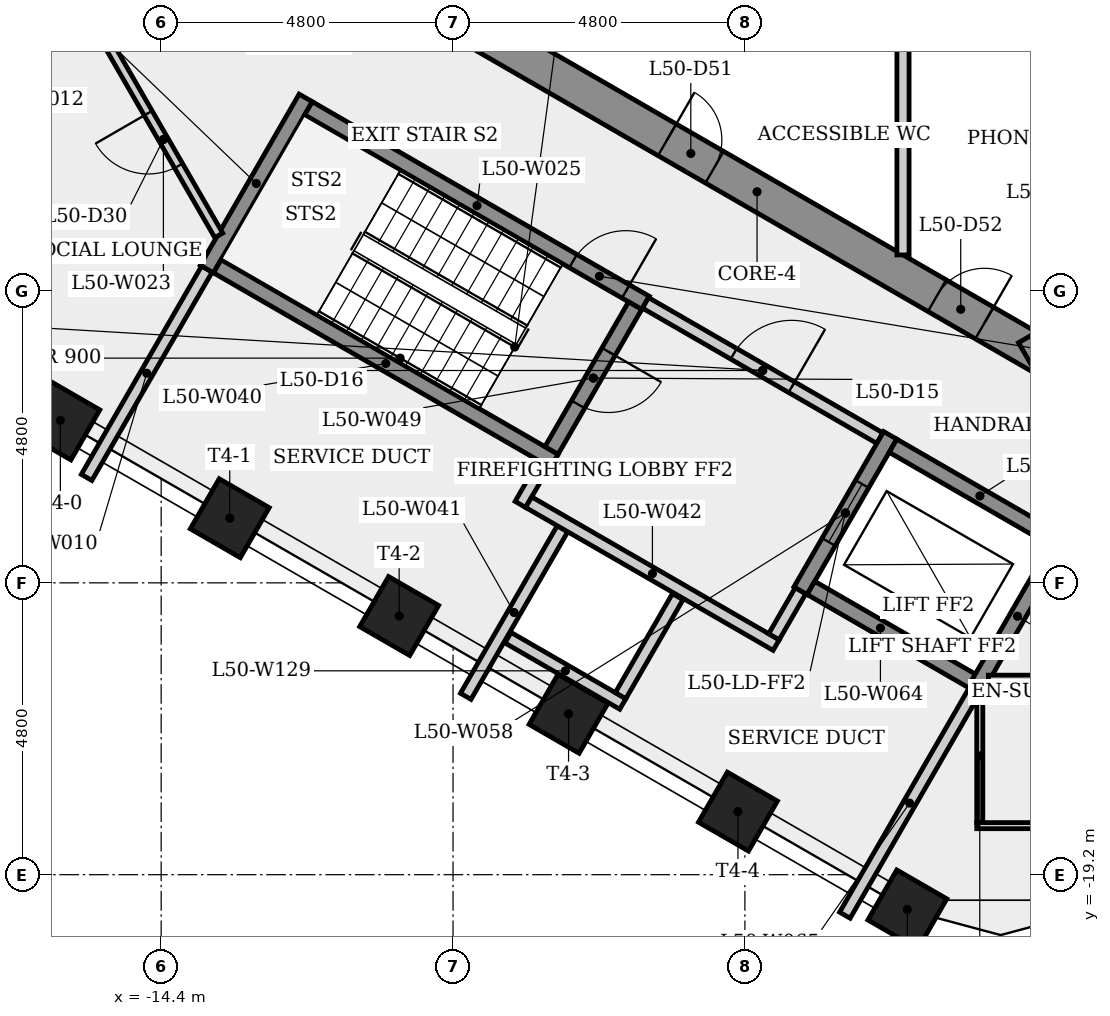
"""IFC4 building model, lengths in metres.
Left out: names, types, materials, properties, quantities, classifications, styles, units other than length and angle.
Written with IfcOpenShell. Run it as: python <this file> out.ifc"""

import sys

from ifc_helpers import new_model, si_unit, direction, frame, frame_2d, origin, origin_2d, place, context, subcontext, project, spatial, rectangle, extrude, element, fill, save


model = new_model("IFC4")
c1 = context("Model", 3, precision=1e-05, world=origin(), true_north=direction((0.0, 1.0)))
c2 = subcontext(c1, "Body", "Model", "MODEL_VIEW")
j1 = project(units=[si_unit("LENGTHUNIT", "METRE"), si_unit("PLANEANGLEUNIT", "RADIAN")], contexts=[c1])
p1 = place(None, origin())
s1 = spatial("IfcSite", under=j1, at=p1, CompositionType="ELEMENT")
p2 = place(p1, origin())
s2 = spatial("IfcBuilding", under=s1, at=p2, CompositionType="ELEMENT")
p3 = place(p2, frame((0.0, 0.0, 186.7)))
s3 = spatial("IfcBuildingStorey", under=s2, at=p3, CompositionType="ELEMENT", Elevation=186.7)
p4 = place(p3, frame((-9.35, -5.225, 0.0), z_axis=(0.0, 0.0, 1.0), x_axis=(0.866023993627, -0.500002442456, 0.0)))
e1 = element("IfcWall", 1, at=p4, inside=s3, PredefinedType="SHEAR", context=c2, shape_type="SweptSolid", body=[
    extrude(rectangle(XDim=10.97, YDim=0.6, at=frame_2d((5.485, 0.0))), origin(), (0.0, 0.0, 1.0), 4.0),
])
p5 = place(p4, frame((3.777, 0.0, 0.0)))
e2 = element("IfcOpeningElement", 2, at=p5, cuts=e1, PredefinedType="OPENING", context=c2, shape_type="SweptSolid", body=[
    extrude(rectangle(XDim=0.9, YDim=2.1, at=frame_2d((0.45, 1.05))), frame((0.0, 0.31, 0.0), z_axis=(0.0, -1.0, 0.0), x_axis=(1.0, 0.0, 0.0)), (0.0, 0.0, 1.0), 0.62),
])
p6 = place(p4, frame((8.903, 0.0, 0.0)))
e3 = element("IfcOpeningElement", 3, at=p6, cuts=e1, PredefinedType="OPENING", context=c2, shape_type="SweptSolid", body=[
    extrude(rectangle(XDim=0.9, YDim=2.1, at=frame_2d((0.45, 1.05))), frame((0.0, 0.31, 0.0), z_axis=(0.0, -1.0, 0.0), x_axis=(1.0, 0.0, 0.0)), (0.0, 0.0, 1.0), 0.62),
])
p7 = place(p3, frame((-0.15, -10.71, 0.0), z_axis=(0.0, 0.0, 1.0), x_axis=(0.866023993627, 0.500002442456, 0.0)))
e4 = element("IfcWall", 4, at=p7, inside=s3, PredefinedType="SHEAR", context=c2, shape_type="SweptSolid", body=[
    extrude(rectangle(XDim=10.97, YDim=0.6, at=frame_2d((5.485, 0.0))), origin(), (0.0, 0.0, 1.0), 4.0),
])
p8 = place(p7, frame((7.628, 0.0, 0.0)))
e5 = element("IfcOpeningElement", 5, at=p8, cuts=e4, PredefinedType="OPENING", context=c2, shape_type="SweptSolid", body=[
    extrude(rectangle(XDim=0.9, YDim=2.1, at=frame_2d((0.45, 1.05))), frame((0.0, 0.31, 0.0), z_axis=(0.0, -1.0, 0.0), x_axis=(1.0, 0.0, 0.0)), (0.0, 0.0, 1.0), 0.62),
])
for number, where, z_axis, x_axis in (
    (6, (-16.058, -11.729, 0.0), (0.0, 0.0, 1.0), (-0.5, -0.866, 0.0)),
    (7, (-13.272, -13.337, 0.0), (0.0, 0.0, 1.0), (-0.5, -0.866, 0.0)),
    (8, (-10.486, -14.946, 0.0), (0.0, 0.0, 1.0), (-0.5, -0.866, 0.0)),
    (9, (-7.7, -16.554, 0.0), (0.0, 0.0, 1.0), (-0.5, -0.866, 0.0)),
    (10, (-4.914, -18.163, 0.0), (0.0, 0.0, 1.0), (-0.5, -0.866, 0.0)),
    (11, (-2.128, -19.771, 0.0), (0.0, 0.0, 1.0), (-0.5, -0.866, 0.0)),
):
    element("IfcColumn", number, at=place(p3, frame(where, z_axis=z_axis, x_axis=x_axis)), inside=s3, PredefinedType="COLUMN", context=c2, shape_type="SweptSolid", body=[
        extrude(rectangle(XDim=0.95, YDim=0.95, at=origin_2d()), origin(), (0.0, 0.0, 1.0), 4.0),
    ])
p9 = place(p3, frame((-15.627, -12.666, 0.0), z_axis=(0.0, 0.0, 1.0), x_axis=(0.499980548326, 0.866036633923, 0.0)))
e12 = element("IfcWall", 12, at=p9, inside=s3, PredefinedType="PLUMBINGWALL", context=c2, shape_type="SweptSolid", body=[
    extrude(rectangle(XDim=3.958, YDim=0.2, at=frame_2d((1.979, 0.0))), origin(), (0.0, 0.0, 1.0), 3.6),
])
p10 = place(p3, frame((-13.648, -9.239, 0.0), z_axis=(0.0, 0.0, 1.0), x_axis=(0.500017246033, 0.866015446554, 0.0)))
e13 = element("IfcWall", 13, at=p10, inside=s3, PredefinedType="SHEAR", context=c2, shape_type="SweptSolid", body=[
    extrude(rectangle(XDim=3.25, YDim=0.25, at=frame_2d((1.625, 0.0))), origin(), (0.0, 0.0, 1.0), 3.6),
])
p11 = place(p3, frame((-13.453, -8.685, 0.0), z_axis=(0.0, 0.0, 1.0), x_axis=(-0.499989401968, 0.866031522475, 0.0)))
e14 = element("IfcWall", 14, at=p11, inside=s3, PredefinedType="PARTITIONING", context=c2, shape_type="SweptSolid", body=[
    extrude(rectangle(XDim=3.642, YDim=0.15, at=frame_2d((1.821, 0.0))), origin(), (0.0, 0.0, 1.0), 3.6),
])
p12 = place(p11, frame((1.321, 0.0, 0.0)))
e15 = element("IfcOpeningElement", 15, at=p12, cuts=e14, PredefinedType="OPENING", context=c2, shape_type="SweptSolid", body=[
    extrude(rectangle(XDim=1.0, YDim=2.1, at=frame_2d((0.5, 1.05))), frame((0.0, 0.085, 0.0), z_axis=(0.0, -1.0, 0.0), x_axis=(1.0, 0.0, 0.0)), (0.0, 0.0, 1.0), 0.17),
])
p13 = place(p3, frame((-11.977, -6.595, 0.0), z_axis=(0.0, 0.0, 1.0), x_axis=(0.866025499775, -0.499999833739, 0.0)))
e16 = element("IfcWall", 16, at=p13, inside=s3, PredefinedType="SHEAR", context=c2, shape_type="SweptSolid", body=[
    extrude(rectangle(XDim=6.4, YDim=0.25, at=frame_2d((3.2, 0.0))), origin(), (0.0, 0.0, 1.0), 3.6),
])
p14 = place(p13, frame((5.025, 0.0, 0.0)))
e17 = element("IfcOpeningElement", 17, at=p14, cuts=e16, PredefinedType="OPENING", context=c2, shape_type="SweptSolid", body=[
    extrude(rectangle(XDim=1.0, YDim=2.1, at=frame_2d((0.5, 1.05))), frame((0.0, 0.135, 0.0), z_axis=(0.0, -1.0, 0.0), x_axis=(1.0, 0.0, 0.0)), (0.0, 0.0, 1.0), 0.27),
])
p15 = place(p3, frame((-8.493, -13.11, 0.0), z_axis=(0.0, 0.0, 1.0), x_axis=(0.500067724834, 0.865986299303, 0.0)))
e18 = element("IfcWall", 18, at=p15, inside=s3, PredefinedType="PLUMBINGWALL", context=c2, shape_type="SweptSolid", body=[
    extrude(rectangle(XDim=0.775, YDim=0.2, at=frame_2d((0.388, 0.0))), origin(), (0.0, 0.0, 1.0), 3.6),
])
p16 = place(p3, frame((-7.935, -12.393, 0.0), z_axis=(0.0, 0.0, 1.0), x_axis=(-0.866025499775, 0.499999833739, 0.0)))
e19 = element("IfcWall", 19, at=p16, inside=s3, PredefinedType="SHEAR", context=c2, shape_type="SweptSolid", body=[
    extrude(rectangle(XDim=6.4, YDim=0.25, at=frame_2d((3.2, 0.0))), origin(), (0.0, 0.0, 1.0), 3.6),
])
p17 = place(p3, frame((-7.8, -13.51, 0.0), z_axis=(0.0, 0.0, 1.0), x_axis=(-0.500016846771, -0.866015677078, 0.0)))
e20 = element("IfcWall", 20, at=p17, inside=s3, PredefinedType="PLUMBINGWALL", context=c2, shape_type="SweptSolid", body=[
    extrude(rectangle(XDim=3.183, YDim=0.2, at=frame_2d((1.591, 0.0))), origin(), (0.0, 0.0, 1.0), 3.6),
])
p18 = place(p3, frame((-8.356, -13.073, 0.0), z_axis=(0.0, 0.0, 1.0), x_axis=(0.866038532462, -0.499977259774, 0.0)))
e21 = element("IfcWall", 21, at=p18, inside=s3, PredefinedType="PLUMBINGWALL", context=c2, shape_type="SweptSolid", body=[
    extrude(rectangle(XDim=4.7, YDim=0.2, at=frame_2d((2.35, 0.0))), origin(), (0.0, 0.0, 1.0), 3.6),
])
p19 = place(p3, frame((-6.605, -9.841, 0.0), z_axis=(0.0, 0.0, 1.0), x_axis=(-0.499996545922, -0.866027397988, 0.0)))
e22 = element("IfcWall", 22, at=p19, inside=s3, PredefinedType="SHEAR", context=c2, shape_type="SweptSolid", body=[
    extrude(rectangle(XDim=2.75, YDim=0.25, at=frame_2d((1.375, 0.0))), origin(), (0.0, 0.0, 1.0), 3.6),
])
p20 = place(p19, frame((0.875, 0.0, 0.0)))
e23 = element("IfcOpeningElement", 23, at=p20, cuts=e22, PredefinedType="OPENING", context=c2, shape_type="SweptSolid", body=[
    extrude(rectangle(XDim=1.0, YDim=2.1, at=frame_2d((0.5, 1.05))), frame((0.0, 0.135, 0.0), z_axis=(0.0, -1.0, 0.0), x_axis=(1.0, 0.0, 0.0)), (0.0, 0.0, 1.0), 0.27),
])
p21 = place(p3, frame((-6.435, -9.795, 0.0), z_axis=(0.0, 0.0, 1.0), x_axis=(0.866012907634, -0.500021643343, 0.0)))
e24 = element("IfcWall", 24, at=p21, inside=s3, PredefinedType="PARTITIONING", context=c2, shape_type="SweptSolid", body=[
    extrude(rectangle(XDim=4.45, YDim=0.2, at=frame_2d((2.225, 0.0))), origin(), (0.0, 0.0, 1.0), 3.6),
])
p22 = place(p21, frame((1.675, 0.0, 0.0)))
e25 = element("IfcOpeningElement", 25, at=p22, cuts=e24, PredefinedType="OPENING", context=c2, shape_type="SweptSolid", body=[
    extrude(rectangle(XDim=1.1, YDim=2.1, at=frame_2d((0.55, 1.05))), frame((0.0, 0.11, 0.0), z_axis=(0.0, -1.0, 0.0), x_axis=(1.0, 0.0, 0.0)), (0.0, 0.0, 1.0), 0.22),
])
p23 = place(p3, frame((-3.885, -14.529, 0.0), z_axis=(0.0, 0.0, 1.0), x_axis=(-0.499859285417, -0.866106630146, 0.0)))
e26 = element("IfcWall", 26, at=p23, inside=s3, PredefinedType="PLUMBINGWALL", context=c2, shape_type="SweptSolid", body=[
    extrude(rectangle(XDim=0.875, YDim=0.2, at=frame_2d((0.438, 0.0))), origin(), (0.0, 0.0, 1.0), 3.6),
])
p24 = place(p3, frame((-2.41, -11.974, 0.0), z_axis=(0.0, 0.0, 1.0), x_axis=(-0.500001826776, -0.866024349092, 0.0)))
e27 = element("IfcWall", 27, at=p24, inside=s3, PredefinedType="SHEAR", context=c2, shape_type="SweptSolid", body=[
    extrude(rectangle(XDim=2.95, YDim=0.25, at=frame_2d((1.475, 0.0))), origin(), (0.0, 0.0, 1.0), 3.6),
])
p25 = place(p24, frame((0.925, 0.0, 0.0)))
e28 = element("IfcOpeningElement", 28, at=p25, cuts=e27, PredefinedType="OPENING", context=c2, shape_type="SweptSolid", body=[
    extrude(rectangle(XDim=1.1, YDim=2.1, at=frame_2d((0.55, 1.05))), frame((0.0, 0.135, 0.0), z_axis=(0.0, -1.0, 0.0), x_axis=(1.0, 0.0, 0.0)), (0.0, 0.0, 1.0), 0.27),
])
p26 = place(p3, frame((-2.364, -12.145, 0.0), z_axis=(0.0, 0.0, 1.0), x_axis=(0.866040211805, -0.499974350878, 0.0)))
e29 = element("IfcWall", 29, at=p26, inside=s3, PredefinedType="SHEAR", context=c2, shape_type="SweptSolid", body=[
    extrude(rectangle(XDim=3.3, YDim=0.25, at=frame_2d((1.65, 0.0))), origin(), (0.0, 0.0, 1.0), 3.6),
])
p27 = place(p3, frame((-2.2, -5.25, 0.0), z_axis=(0.0, 0.0, 1.0), x_axis=(0.0, -1.0, 0.0)))
e30 = element("IfcWall", 30, at=p27, inside=s3, PredefinedType="PARTITIONING", context=c2, shape_type="SweptSolid", body=[
    extrude(rectangle(XDim=3.757, YDim=0.2, at=frame_2d((1.878, 0.0))), origin(), (0.0, 0.0, 1.0), 3.6),
])
p28 = place(p3, frame((-0.856, -16.133, 0.0), z_axis=(0.0, 0.0, 1.0), x_axis=(-0.866021716278, 0.500006386895, 0.0)))
e31 = element("IfcWall", 31, at=p28, inside=s3, PredefinedType="SHEAR", context=c2, shape_type="SweptSolid", body=[
    extrude(rectangle(XDim=3.3, YDim=0.25, at=frame_2d((1.65, 0.0))), origin(), (0.0, 0.0, 1.0), 3.6),
])
p29 = place(p3, frame((-1.027, -16.179, 0.0), z_axis=(0.0, 0.0, 1.0), x_axis=(-0.500011993549, -0.866018479195, 0.0)))
e32 = element("IfcWall", 32, at=p29, inside=s3, PredefinedType="PLUMBINGWALL", context=c2, shape_type="SweptSolid", body=[
    extrude(rectangle(XDim=4.258, YDim=0.2, at=frame_2d((2.129, 0.0))), origin(), (0.0, 0.0, 1.0), 3.6),
])
p30 = place(p3, frame((-0.987, -18.393, 0.0), z_axis=(0.0, 0.0, 1.0), x_axis=(1.0, 0.0, 0.0)))
e33 = element("IfcWall", 33, at=p30, inside=s3, PredefinedType="PARTITIONING", context=c2, shape_type="SweptSolid", body=[
    extrude(rectangle(XDim=2.4, YDim=0.1, at=frame_2d((1.2, 0.0))), origin(), (0.0, 0.0, 1.0), 3.6),
])
p31 = place(p3, frame((-0.937, -16.148, 0.0), z_axis=(0.0, 0.0, 1.0), x_axis=(0.0, -1.0, 0.0)))
e34 = element("IfcWall", 34, at=p31, inside=s3, PredefinedType="PARTITIONING", context=c2, shape_type="SweptSolid", body=[
    extrude(rectangle(XDim=2.195, YDim=0.1, at=frame_2d((1.098, 0.0))), origin(), (0.0, 0.0, 1.0), 3.6),
])
p32 = place(p3, frame((0.323, -13.841, 0.0), z_axis=(0.0, 0.0, 1.0), x_axis=(-0.500066320839, -0.865987110044, 0.0)))
e35 = element("IfcWall", 35, at=p32, inside=s3, PredefinedType="SHEAR", context=c2, shape_type="SweptSolid", body=[
    extrude(rectangle(XDim=2.561, YDim=0.25, at=frame_2d((1.28, 0.0))), origin(), (0.0, 0.0, 1.0), 4.0),
])
p33 = place(p3, frame((-0.795, -15.993, 0.0), z_axis=(0.0, 0.0, 1.0), x_axis=(1.0, 0.0, 0.0)))
e36 = element("IfcWall", 36, at=p33, inside=s3, PredefinedType="PARTITIONING", context=c2, shape_type="SweptSolid", body=[
    extrude(rectangle(XDim=4.386, YDim=0.15, at=frame_2d((2.193, 0.0))), origin(), (0.0, 0.0, 1.0), 3.6),
])
p34 = place(p33, frame((2.837, 0.0, 0.0)))
e37 = element("IfcOpeningElement", 37, at=p34, cuts=e36, PredefinedType="OPENING", context=c2, shape_type="SweptSolid", body=[
    extrude(rectangle(XDim=0.9, YDim=2.1, at=frame_2d((0.45, 1.05))), frame((0.0, 0.085, 0.0), z_axis=(0.0, -1.0, 0.0), x_axis=(1.0, 0.0, 0.0)), (0.0, 0.0, 1.0), 0.17),
])
p35 = place(p3, frame((-6.808, -16.392, 0.0), z_axis=(0.0, 0.0, 1.0), x_axis=(-0.866008413041, 0.500029427677, 0.0)))
e38 = element("IfcWall", 38, at=p35, inside=s3, PredefinedType="PLUMBINGWALL", context=c2, shape_type="SweptSolid", body=[
    extrude(rectangle(XDim=2.18, YDim=0.2, at=frame_2d((1.09, 0.0))), origin(), (0.0, 0.0, 1.0), 3.6),
])
p36 = place(p3, frame((-5.905, -14.627, 0.0), z_axis=(0.0, 0.0, 1.0), x_axis=(-0.499966013754, -0.866045024864, 0.0)))
e39 = element("IfcWall", 39, at=p36, inside=s3, PredefinedType="PLUMBINGWALL", context=c2, shape_type="SweptSolid", body=[
    extrude(rectangle(XDim=1.88, YDim=0.2, at=frame_2d((0.94, 0.0))), origin(), (0.0, 0.0, 1.0), 3.6),
])
p37 = place(p14, origin())
e40 = element("IfcDoor", 40, at=p37, inside=s3, OperationType="SINGLE_SWING_RIGHT", PredefinedType="DOOR", context=c2, shape_type="SweptSolid", body=[
    extrude(rectangle(XDim=1.0, YDim=2.1, at=frame_2d((0.5, 1.05))), frame((0.0, 0.025, 0.0), z_axis=(0.0, -1.0, 0.0), x_axis=(1.0, 0.0, 0.0)), (0.0, 0.0, 1.0), 0.05),
])
fill(e17, e40)
p38 = place(p20, origin())
e41 = element("IfcDoor", 41, at=p38, inside=s3, OperationType="SINGLE_SWING_LEFT", PredefinedType="DOOR", context=c2, shape_type="SweptSolid", body=[
    extrude(rectangle(XDim=1.0, YDim=2.1, at=frame_2d((0.5, 1.05))), frame((0.0, 0.025, 0.0), z_axis=(0.0, -1.0, 0.0), x_axis=(1.0, 0.0, 0.0)), (0.0, 0.0, 1.0), 0.05),
])
fill(e23, e41)
p39 = place(p22, origin())
e42 = element("IfcDoor", 42, at=p39, inside=s3, OperationType="SINGLE_SWING_RIGHT", PredefinedType="DOOR", context=c2, shape_type="SweptSolid", body=[
    extrude(rectangle(XDim=1.1, YDim=2.1, at=frame_2d((0.55, 1.05))), frame((0.0, 0.025, 0.0), z_axis=(0.0, -1.0, 0.0), x_axis=(1.0, 0.0, 0.0)), (0.0, 0.0, 1.0), 0.05),
])
fill(e25, e42)
p40 = place(p25, origin())
e43 = element("IfcDoor", 43, at=p40, inside=s3, OperationType="SLIDING_TO_LEFT", PredefinedType="DOOR", context=c2, shape_type="SweptSolid", body=[
    extrude(rectangle(XDim=1.1, YDim=2.1, at=frame_2d((0.55, 1.05))), frame((0.0, 0.025, 0.0), z_axis=(0.0, -1.0, 0.0), x_axis=(1.0, 0.0, 0.0)), (0.0, 0.0, 1.0), 0.05),
])
fill(e28, e43)
p41 = place(p12, origin())
e44 = element("IfcDoor", 44, at=p41, inside=s3, OperationType="SINGLE_SWING_RIGHT", PredefinedType="DOOR", context=c2, shape_type="SweptSolid", body=[
    extrude(rectangle(XDim=1.0, YDim=2.1, at=frame_2d((0.5, 1.05))), frame((0.0, 0.025, 0.0), z_axis=(0.0, -1.0, 0.0), x_axis=(1.0, 0.0, 0.0)), (0.0, 0.0, 1.0), 0.05),
])
fill(e15, e44)
p42 = place(p5, origin())
e45 = element("IfcDoor", 45, at=p42, inside=s3, OperationType="SINGLE_SWING_LEFT", PredefinedType="DOOR", context=c2, shape_type="SweptSolid", body=[
    extrude(rectangle(XDim=0.9, YDim=2.1, at=frame_2d((0.45, 1.05))), frame((0.0, 0.025, 0.0), z_axis=(0.0, -1.0, 0.0), x_axis=(1.0, 0.0, 0.0)), (0.0, 0.0, 1.0), 0.05),
])
fill(e2, e45)
p43 = place(p6, origin())
e46 = element("IfcDoor", 46, at=p43, inside=s3, OperationType="SINGLE_SWING_RIGHT", PredefinedType="DOOR", context=c2, shape_type="SweptSolid", body=[
    extrude(rectangle(XDim=0.9, YDim=2.1, at=frame_2d((0.45, 1.05))), frame((0.0, 0.025, 0.0), z_axis=(0.0, -1.0, 0.0), x_axis=(1.0, 0.0, 0.0)), (0.0, 0.0, 1.0), 0.05),
])
fill(e3, e46)
save(model, sys.argv[1])
